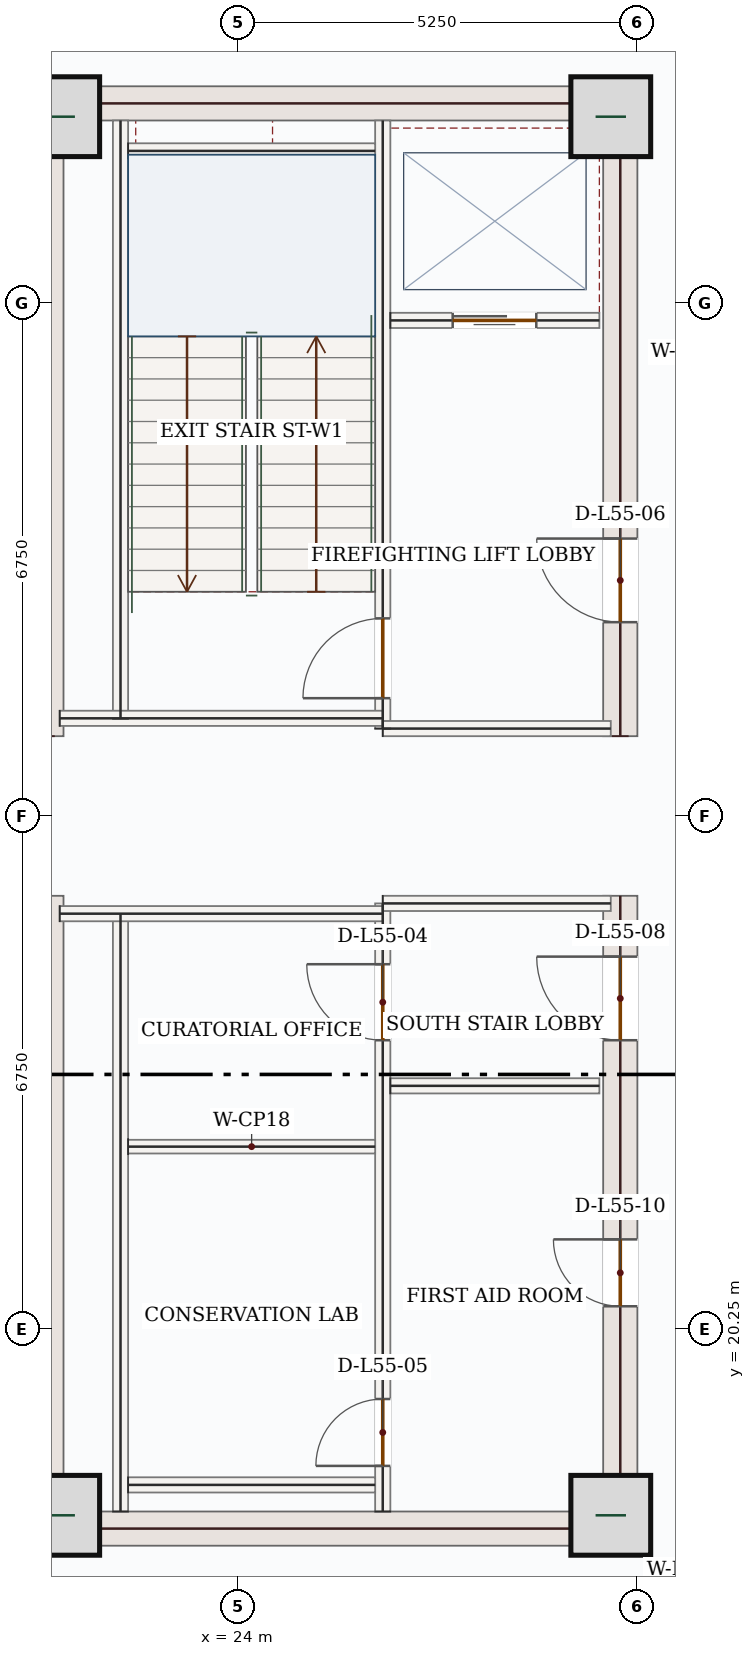
"""IFC4 building model, lengths in metres.
Left out: names, types, materials, properties, quantities, classifications, styles, units other than length and angle.
Written with IfcOpenShell. Run it as: python <this file> out.ifc"""

import sys

from ifc_helpers import new_model, si_unit, direction, frame, frame_2d, origin, origin_2d, place, context, subcontext, project, spatial, rectangle, extrude, source, transform, mapped, element, fill, save


model = new_model("IFC4")
c1 = context("Model", 3, precision=1e-05, world=origin(), true_north=direction((0.0, 1.0)))
c2 = subcontext(c1, "Body", "Model", "MODEL_VIEW")
j1 = project(units=[si_unit("LENGTHUNIT", "METRE"), si_unit("PLANEANGLEUNIT", "RADIAN")], contexts=[c1])
p1 = place(None, origin())
s1 = spatial("IfcSite", under=j1, at=p1, CompositionType="ELEMENT")
p2 = place(p1, origin())
s2 = spatial("IfcBuilding", under=s1, at=p2, CompositionType="ELEMENT")
p3 = place(p2, frame((0.0, 0.0, 234.3)))
s3 = spatial("IfcBuildingStorey", under=s2, at=p3, CompositionType="ELEMENT", Elevation=234.3)
m1 = source(origin(), c2, "Body", "SweptSolid", [
    extrude(rectangle(XDim=8.55, YDim=0.45, at=frame_2d((4.275, 0.0))), origin(), (0.0, 0.0, 1.0), 4.55),
])
for number, where, z_axis, x_axis in (
    (1, (21.475, 17.4, 0.0), (0.0, 0.0, 1.0), (0.0, 1.0, 0.0)),
    (2, (21.475, 28.05, 0.0), (0.0, 0.0, 1.0), (0.0, 1.0, 0.0)),
):
    element("IfcWall", number, at=place(p3, frame(where, z_axis=z_axis, x_axis=x_axis)), inside=s3, PredefinedType="SHEAR", context=c2, shape_type="MappedRepresentation", body=[
        mapped(m1, transform((0.0, 0.0, 0.0), x_axis=(1.0, 0.0, 0.0), y_axis=(0.0, 1.0, 0.0), z_axis=(0.0, 0.0, 1.0), scale=1.0)),
    ])
p4 = place(p3, frame((29.025, 17.4, 0.0), z_axis=(0.0, 0.0, 1.0), x_axis=(0.0, 1.0, 0.0)))
e3 = element("IfcWall", 3, at=p4, inside=s3, PredefinedType="SHEAR", context=c2, shape_type="SweptSolid", body=[
    extrude(rectangle(XDim=8.55, YDim=0.45, at=frame_2d((4.275, 0.0))), origin(), (0.0, 0.0, 1.0), 4.55),
])
p5 = place(p4, frame((6.65, 0.0, 0.0)))
e4 = element("IfcOpeningElement", 4, at=p5, cuts=e3, PredefinedType="OPENING", context=c2, shape_type="SweptSolid", body=[
    extrude(rectangle(XDim=1.1, YDim=2.2, at=frame_2d((0.55, 1.1))), frame((0.0, 0.235, 0.0), z_axis=(0.0, -1.0, 0.0), x_axis=(1.0, 0.0, 0.0)), (0.0, 0.0, 1.0), 0.47),
])
p6 = place(p4, frame((3.15, 0.0, 0.0)))
e5 = element("IfcOpeningElement", 5, at=p6, cuts=e3, PredefinedType="OPENING", context=c2, shape_type="SweptSolid", body=[
    extrude(rectangle(XDim=0.88, YDim=2.1, at=frame_2d((0.44, 1.05))), frame((0.0, 0.235, 0.0), z_axis=(0.0, -1.0, 0.0), x_axis=(1.0, 0.0, 0.0)), (0.0, 0.0, 1.0), 0.47),
])
p7 = place(p3, frame((29.025, 28.05, 0.0), z_axis=(0.0, 0.0, 1.0), x_axis=(0.0, 1.0, 0.0)))
e6 = element("IfcWall", 6, at=p7, inside=s3, PredefinedType="SHEAR", context=c2, shape_type="SweptSolid", body=[
    extrude(rectangle(XDim=8.55, YDim=0.45, at=frame_2d((4.275, 0.0))), origin(), (0.0, 0.0, 1.0), 4.55),
])
p8 = place(p7, frame((1.5, 0.0, 0.0)))
e7 = element("IfcOpeningElement", 7, at=p8, cuts=e6, PredefinedType="OPENING", context=c2, shape_type="SweptSolid", body=[
    extrude(rectangle(XDim=1.1, YDim=2.2, at=frame_2d((0.55, 1.1))), frame((0.0, 0.235, 0.0), z_axis=(0.0, -1.0, 0.0), x_axis=(1.0, 0.0, 0.0)), (0.0, 0.0, 1.0), 0.47),
])
m2 = source(origin(), c2, "Body", "SweptSolid", [
    extrude(rectangle(XDim=7.1, YDim=0.45, at=frame_2d((3.55, 0.0))), origin(), (0.0, 0.0, 1.0), 4.55),
])
for number, where, z_axis, x_axis in (
    (8, (21.7, 17.625, 0.0), (0.0, 0.0, 1.0), (1.0, 0.0, 0.0)),
    (9, (21.7, 36.375, 0.0), (0.0, 0.0, 1.0), (1.0, 0.0, 0.0)),
):
    element("IfcWall", number, at=place(p3, frame(where, z_axis=z_axis, x_axis=x_axis)), inside=s3, PredefinedType="SHEAR", context=c2, shape_type="MappedRepresentation", body=[
        mapped(m2, transform((0.0, 0.0, 0.0), x_axis=(1.0, 0.0, 0.0), y_axis=(0.0, 1.0, 0.0), z_axis=(0.0, 0.0, 1.0), scale=1.0)),
    ])
m3 = source(origin(), c2, "Body", "SweptSolid", [
    extrude(rectangle(XDim=1.05, YDim=1.05, at=origin_2d()), origin(), (0.0, 0.0, 1.0), 4.8),
])
for number, where, z_axis, x_axis in (
    (10, (21.65, 17.8, 0.0), (0.0, 0.0, 1.0), (1.0, 0.0, 0.0)),
    (11, (28.9, 17.8, 0.0), (0.0, 0.0, 1.0), (1.0, 0.0, 0.0)),
    (12, (21.65, 36.2, 0.0), (0.0, 0.0, 1.0), (1.0, 0.0, 0.0)),
    (13, (28.9, 36.2, 0.0), (0.0, 0.0, 1.0), (1.0, 0.0, 0.0)),
):
    element("IfcColumn", number, at=place(p3, frame(where, z_axis=z_axis, x_axis=x_axis)), inside=s3, PredefinedType="COLUMN", context=c2, shape_type="MappedRepresentation", body=[
        mapped(m3, transform((0.0, 0.0, 0.0), x_axis=(1.0, 0.0, 0.0), y_axis=(0.0, 1.0, 0.0), z_axis=(0.0, 0.0, 1.0), scale=1.0)),
    ])
m4 = source(origin(), c2, "Body", "SweptSolid", [
    extrude(rectangle(XDim=5.258, YDim=0.28, at=frame_2d((2.629, 0.0))), origin(), (0.0, 0.0, 1.0), 4.55),
])
p9 = place(p3, frame((18.94, 35.542, 0.0), z_axis=(0.0, 0.0, 1.0), x_axis=(0.707106781187, 0.707106781187, 0.0)))
e14 = element("IfcWall", 14, at=p9, inside=s3, PredefinedType="SOLIDWALL", context=c2, shape_type="MappedRepresentation", body=[
    mapped(m4, transform((0.0, 0.0, 0.0), x_axis=(1.0, 0.0, 0.0), y_axis=(0.0, 1.0, 0.0), z_axis=(0.0, 0.0, 1.0), scale=1.0)),
])
m5 = source(origin(), c2, "Body", "SweptSolid", [
    extrude(rectangle(XDim=7.87, YDim=0.2, at=frame_2d((3.935, 0.0))), origin(), (0.0, 0.0, 1.0), 4.55),
])
for number, where, z_axis, x_axis in (
    (15, (22.45, 17.85, 0.0), (0.0, 0.0, 1.0), (0.0, 1.0, 0.0)),
    (16, (22.45, 28.28, 0.0), (0.0, 0.0, 1.0), (0.0, 1.0, 0.0)),
):
    element("IfcWall", number, at=place(p3, frame(where, z_axis=z_axis, x_axis=x_axis)), inside=s3, PredefinedType="SOLIDWALL", context=c2, shape_type="MappedRepresentation", body=[
        mapped(m5, transform((0.0, 0.0, 0.0), x_axis=(1.0, 0.0, 0.0), y_axis=(0.0, 1.0, 0.0), z_axis=(0.0, 0.0, 1.0), scale=1.0)),
    ])
p10 = place(p3, frame((25.9, 17.85, 0.0), z_axis=(0.0, 0.0, 1.0), x_axis=(0.0, 1.0, 0.0)))
e17 = element("IfcWall", 17, at=p10, inside=s3, PredefinedType="SOLIDWALL", context=c2, shape_type="SweptSolid", body=[
    extrude(rectangle(XDim=8.0, YDim=0.2, at=frame_2d((4.0, 0.0))), origin(), (0.0, 0.0, 1.0), 4.55),
])
p11 = place(p10, frame((6.2, 0.0, 0.0)))
e18 = element("IfcOpeningElement", 18, at=p11, cuts=e17, PredefinedType="OPENING", context=c2, shape_type="SweptSolid", body=[
    extrude(rectangle(XDim=1.0, YDim=2.15, at=frame_2d((0.5, 1.075))), frame((0.0, 0.11, 0.0), z_axis=(0.0, -1.0, 0.0), x_axis=(1.0, 0.0, 0.0)), (0.0, 0.0, 1.0), 0.22),
])
p12 = place(p10, frame((0.6, 0.0, 0.0)))
e19 = element("IfcOpeningElement", 19, at=p12, cuts=e17, PredefinedType="OPENING", context=c2, shape_type="SweptSolid", body=[
    extrude(rectangle(XDim=0.88, YDim=2.1, at=frame_2d((0.44, 1.05))), frame((0.0, 0.11, 0.0), z_axis=(0.0, -1.0, 0.0), x_axis=(1.0, 0.0, 0.0)), (0.0, 0.0, 1.0), 0.22),
])
p13 = place(p3, frame((25.9, 28.15, 0.0), z_axis=(0.0, 0.0, 1.0), x_axis=(0.0, 1.0, 0.0)))
e20 = element("IfcWall", 20, at=p13, inside=s3, PredefinedType="SOLIDWALL", context=c2, shape_type="SweptSolid", body=[
    extrude(rectangle(XDim=8.0, YDim=0.2, at=frame_2d((4.0, 0.0))), origin(), (0.0, 0.0, 1.0), 4.55),
])
p14 = place(p13, frame((0.4, 0.0, 0.0)))
e21 = element("IfcOpeningElement", 21, at=p14, cuts=e20, PredefinedType="OPENING", context=c2, shape_type="SweptSolid", body=[
    extrude(rectangle(XDim=1.05, YDim=2.15, at=frame_2d((0.525, 1.075))), frame((0.0, 0.11, 0.0), z_axis=(0.0, -1.0, 0.0), x_axis=(1.0, 0.0, 0.0)), (0.0, 0.0, 1.0), 0.22),
])
m6 = source(origin(), c2, "Body", "SweptSolid", [
    extrude(rectangle(XDim=4.25, YDim=0.2, at=frame_2d((2.125, 0.0))), origin(), (0.0, 0.0, 1.0), 4.55),
])
p15 = place(p3, frame((21.65, 25.715, 0.0), z_axis=(0.0, 0.0, 1.0), x_axis=(1.0, 0.0, 0.0)))
e22 = element("IfcWall", 22, at=p15, inside=s3, PredefinedType="SOLIDWALL", context=c2, shape_type="MappedRepresentation", body=[
    mapped(m6, transform((0.0, 0.0, 0.0), x_axis=(1.0, 0.0, 0.0), y_axis=(0.0, 1.0, 0.0), z_axis=(0.0, 0.0, 1.0), scale=1.0)),
])
m7 = source(origin(), c2, "Body", "SweptSolid", [
    extrude(rectangle(XDim=3.0, YDim=0.2, at=frame_2d((1.5, 0.0))), origin(), (0.0, 0.0, 1.0), 4.55),
])
p16 = place(p3, frame((25.9, 25.85, 0.0), z_axis=(0.0, 0.0, 1.0), x_axis=(1.0, 0.0, 0.0)))
e23 = element("IfcWall", 23, at=p16, inside=s3, PredefinedType="SOLIDWALL", context=c2, shape_type="MappedRepresentation", body=[
    mapped(m7, transform((0.0, 0.0, 0.0), x_axis=(1.0, 0.0, 0.0), y_axis=(0.0, 1.0, 0.0), z_axis=(0.0, 0.0, 1.0), scale=1.0)),
])
p17 = place(p3, frame((21.65, 28.285, 0.0), z_axis=(0.0, 0.0, 1.0), x_axis=(1.0, 0.0, 0.0)))
e24 = element("IfcWall", 24, at=p17, inside=s3, PredefinedType="SOLIDWALL", context=c2, shape_type="MappedRepresentation", body=[
    mapped(m6, transform((0.0, 0.0, 0.0), x_axis=(1.0, 0.0, 0.0), y_axis=(0.0, 1.0, 0.0), z_axis=(0.0, 0.0, 1.0), scale=1.0)),
])
p18 = place(p3, frame((25.9, 28.15, 0.0), z_axis=(0.0, 0.0, 1.0), x_axis=(1.0, 0.0, 0.0)))
e25 = element("IfcWall", 25, at=p18, inside=s3, PredefinedType="SOLIDWALL", context=c2, shape_type="MappedRepresentation", body=[
    mapped(m7, transform((0.0, 0.0, 0.0), x_axis=(1.0, 0.0, 0.0), y_axis=(0.0, 1.0, 0.0), z_axis=(0.0, 0.0, 1.0), scale=1.0)),
])
m8 = source(origin(), c2, "Body", "SweptSolid", [
    extrude(rectangle(XDim=3.25, YDim=0.2, at=frame_2d((1.625, 0.0))), origin(), (0.0, 0.0, 1.0), 4.55),
])
for number, where, z_axis, x_axis in (
    (26, (22.55, 35.75, 0.0), (0.0, 0.0, 1.0), (1.0, 0.0, 0.0)),
    (27, (22.55, 18.2, 0.0), (0.0, 0.0, 1.0), (1.0, 0.0, 0.0)),
):
    element("IfcWall", number, at=place(p3, frame(where, z_axis=z_axis, x_axis=x_axis)), inside=s3, PredefinedType="SOLIDWALL", context=c2, shape_type="MappedRepresentation", body=[
        mapped(m8, transform((0.0, 0.0, 0.0), x_axis=(1.0, 0.0, 0.0), y_axis=(0.0, 1.0, 0.0), z_axis=(0.0, 0.0, 1.0), scale=1.0)),
    ])
m9 = source(origin(), c2, "Body", "SweptSolid", [
    extrude(rectangle(XDim=3.25, YDim=0.18, at=frame_2d((1.625, 0.0))), origin(), (0.0, 0.0, 1.0), 4.55),
])
p19 = place(p3, frame((22.55, 22.65, 0.0), z_axis=(0.0, 0.0, 1.0), x_axis=(1.0, 0.0, 0.0)))
e28 = element("IfcWall", 28, at=p19, inside=s3, PredefinedType="PARTITIONING", context=c2, shape_type="MappedRepresentation", body=[
    mapped(m9, transform((0.0, 0.0, 0.0), x_axis=(1.0, 0.0, 0.0), y_axis=(0.0, 1.0, 0.0), z_axis=(0.0, 0.0, 1.0), scale=1.0)),
])
p20 = place(p3, frame((26.0, 33.52, 0.0), z_axis=(0.0, 0.0, 1.0), x_axis=(1.0, 0.0, 0.0)))
e29 = element("IfcWall", 29, at=p20, inside=s3, PredefinedType="SOLIDWALL", context=c2, shape_type="SweptSolid", body=[
    extrude(rectangle(XDim=2.75, YDim=0.2, at=frame_2d((1.375, 0.0))), origin(), (0.0, 0.0, 1.0), 4.55),
])
p21 = place(p20, frame((0.82, 0.0, 0.0)))
e30 = element("IfcOpeningElement", 30, at=p21, cuts=e29, PredefinedType="OPENING", context=c2, shape_type="SweptSolid", body=[
    extrude(rectangle(XDim=1.1, YDim=2.15, at=frame_2d((0.55, 1.075))), frame((0.0, 0.11, 0.0), z_axis=(0.0, -1.0, 0.0), x_axis=(1.0, 0.0, 0.0)), (0.0, 0.0, 1.0), 0.22),
])
m10 = source(origin(), c2, "Body", "SweptSolid", [
    extrude(rectangle(XDim=2.75, YDim=0.2, at=frame_2d((1.375, 0.0))), origin(), (0.0, 0.0, 1.0), 4.55),
])
p22 = place(p3, frame((26.0, 23.45, 0.0), z_axis=(0.0, 0.0, 1.0), x_axis=(1.0, 0.0, 0.0)))
e31 = element("IfcWall", 31, at=p22, inside=s3, PredefinedType="SOLIDWALL", context=c2, shape_type="MappedRepresentation", body=[
    mapped(m10, transform((0.0, 0.0, 0.0), x_axis=(1.0, 0.0, 0.0), y_axis=(0.0, 1.0, 0.0), z_axis=(0.0, 0.0, 1.0), scale=1.0)),
])
m11 = source(origin(), c2, "Body", "SweptSolid", [
    extrude(rectangle(XDim=1.05, YDim=2.15, at=frame_2d((0.525, 1.075))), frame((0.0, 0.025, 0.0), z_axis=(0.0, -1.0, 0.0), x_axis=(1.0, 0.0, 0.0)), (0.0, 0.0, 1.0), 0.05),
])
p23 = place(p14, origin())
e32 = element("IfcDoor", 32, at=p23, inside=s3, OperationType="SINGLE_SWING_LEFT", PredefinedType="DOOR", context=c2, shape_type="MappedRepresentation", body=[
    mapped(m11, transform((0.0, 0.0, 0.0), x_axis=(1.0, 0.0, 0.0), y_axis=(0.0, 1.0, 0.0), z_axis=(0.0, 0.0, 1.0), scale=1.0)),
])
fill(e21, e32)
m12 = source(origin(), c2, "Body", "SweptSolid", [
    extrude(rectangle(XDim=1.0, YDim=2.15, at=frame_2d((0.5, 1.075))), frame((0.0, 0.025, 0.0), z_axis=(0.0, -1.0, 0.0), x_axis=(1.0, 0.0, 0.0)), (0.0, 0.0, 1.0), 0.05),
])
p24 = place(p11, origin())
e33 = element("IfcDoor", 33, at=p24, inside=s3, OperationType="SINGLE_SWING_RIGHT", PredefinedType="DOOR", context=c2, shape_type="MappedRepresentation", body=[
    mapped(m12, transform((0.0, 0.0, 0.0), x_axis=(1.0, 0.0, 0.0), y_axis=(0.0, 1.0, 0.0), z_axis=(0.0, 0.0, 1.0), scale=1.0)),
])
fill(e18, e33)
m13 = source(origin(), c2, "Body", "SweptSolid", [
    extrude(rectangle(XDim=0.88, YDim=2.1, at=frame_2d((0.44, 1.05))), frame((0.0, 0.025, 0.0), z_axis=(0.0, -1.0, 0.0), x_axis=(1.0, 0.0, 0.0)), (0.0, 0.0, 1.0), 0.05),
])
p25 = place(p12, origin())
e34 = element("IfcDoor", 34, at=p25, inside=s3, OperationType="SINGLE_SWING_LEFT", PredefinedType="DOOR", context=c2, shape_type="MappedRepresentation", body=[
    mapped(m13, transform((0.0, 0.0, 0.0), x_axis=(1.0, 0.0, 0.0), y_axis=(0.0, 1.0, 0.0), z_axis=(0.0, 0.0, 1.0), scale=1.0)),
])
fill(e19, e34)
m14 = source(origin(), c2, "Body", "SweptSolid", [
    extrude(rectangle(XDim=1.1, YDim=2.15, at=frame_2d((0.55, 1.075))), frame((0.0, 0.025, 0.0), z_axis=(0.0, -1.0, 0.0), x_axis=(1.0, 0.0, 0.0)), (0.0, 0.0, 1.0), 0.05),
])
p26 = place(p21, origin())
e35 = element("IfcDoor", 35, at=p26, inside=s3, OperationType="DOUBLE_DOOR_SLIDING", PredefinedType="DOOR", context=c2, shape_type="MappedRepresentation", body=[
    mapped(m14, transform((0.0, 0.0, 0.0), x_axis=(1.0, 0.0, 0.0), y_axis=(0.0, 1.0, 0.0), z_axis=(0.0, 0.0, 1.0), scale=1.0)),
])
fill(e30, e35)
m15 = source(origin(), c2, "Body", "SweptSolid", [
    extrude(rectangle(XDim=1.1, YDim=2.2, at=frame_2d((0.55, 1.1))), frame((0.0, 0.025, 0.0), z_axis=(0.0, -1.0, 0.0), x_axis=(1.0, 0.0, 0.0)), (0.0, 0.0, 1.0), 0.05),
])
p27 = place(p8, origin())
e36 = element("IfcDoor", 36, at=p27, inside=s3, OperationType="SINGLE_SWING_RIGHT", PredefinedType="DOOR", context=c2, shape_type="MappedRepresentation", body=[
    mapped(m15, transform((0.0, 0.0, 0.0), x_axis=(1.0, 0.0, 0.0), y_axis=(0.0, 1.0, 0.0), z_axis=(0.0, 0.0, 1.0), scale=1.0)),
])
fill(e7, e36)
p28 = place(p5, origin())
e37 = element("IfcDoor", 37, at=p28, inside=s3, OperationType="SINGLE_SWING_RIGHT", PredefinedType="DOOR", context=c2, shape_type="MappedRepresentation", body=[
    mapped(m15, transform((0.0, 0.0, 0.0), x_axis=(1.0, 0.0, 0.0), y_axis=(0.0, 1.0, 0.0), z_axis=(0.0, 0.0, 1.0), scale=1.0)),
])
fill(e4, e37)
p29 = place(p6, origin())
e38 = element("IfcDoor", 38, at=p29, inside=s3, OperationType="SINGLE_SWING_RIGHT", PredefinedType="DOOR", context=c2, shape_type="MappedRepresentation", body=[
    mapped(m13, transform((0.0, 0.0, 0.0), x_axis=(1.0, 0.0, 0.0), y_axis=(0.0, 1.0, 0.0), z_axis=(0.0, 0.0, 1.0), scale=1.0)),
])
fill(e5, e38)
save(model, sys.argv[1])
